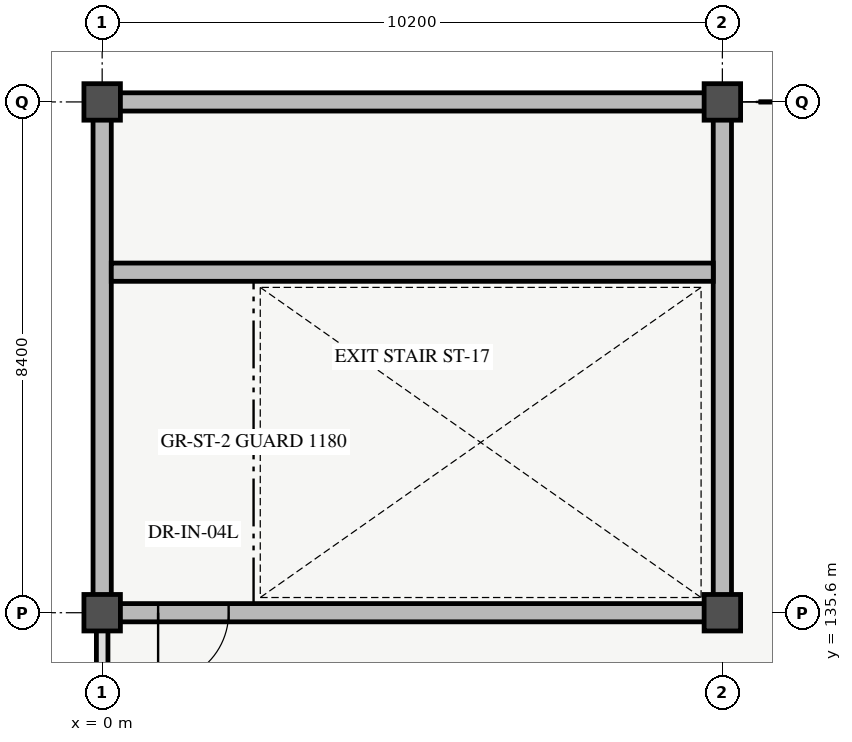
"""IFC4 building model, lengths in metres.
Left out: names, types, materials, properties, quantities, classifications, styles, units other than length and angle.
Written with IfcOpenShell. Run it as: python <this file> out.ifc"""

import sys

from ifc_helpers import new_model, si_unit, direction, frame, frame_2d, origin, origin_2d, place, context, subcontext, project, spatial, rectangle, extrude, element, fill, save


model = new_model("IFC4")
c1 = context("Model", 3, precision=1e-05, world=origin(), true_north=direction((0.0, 1.0)))
c2 = subcontext(c1, "Body", "Model", "MODEL_VIEW")
j1 = project(units=[si_unit("LENGTHUNIT", "METRE"), si_unit("PLANEANGLEUNIT", "RADIAN")], contexts=[c1])
p1 = place(None, origin())
s1 = spatial("IfcSite", under=j1, at=p1, CompositionType="ELEMENT")
p2 = place(p1, origin())
s2 = spatial("IfcBuilding", under=s1, at=p2, CompositionType="ELEMENT")
p3 = place(p2, frame((0.0, 0.0, 23.4)))
s3 = spatial("IfcBuildingStorey", under=s2, at=p3, CompositionType="ELEMENT", Elevation=23.4)
for number, where, z_axis, x_axis in (
    (1, (0.0, 135.6, 0.0), (0.0, 0.0, 1.0), (1.0, 0.0, 0.0)),
    (2, (0.0, 144.0, 0.0), (0.0, 0.0, 1.0), (1.0, 0.0, 0.0)),
    (3, (10.2, 135.6, 0.0), (0.0, 0.0, 1.0), (1.0, 0.0, 0.0)),
    (4, (10.2, 144.0, 0.0), (0.0, 0.0, 1.0), (1.0, 0.0, 0.0)),
):
    element("IfcColumn", number, at=place(p3, frame(where, z_axis=z_axis, x_axis=x_axis)), inside=s3, PredefinedType="COLUMN", context=c2, shape_type="SweptSolid", body=[
        extrude(rectangle(XDim=0.6, YDim=0.6, at=origin_2d()), origin(), (0.0, 0.0, 1.0), 4.2),
    ])
p4 = place(p3, frame((0.0, 127.44, 0.0), z_axis=(0.0, 0.0, 1.0), x_axis=(0.0, 1.0, 0.0)))
e5 = element("IfcWall", 5, at=p4, inside=s3, PredefinedType="STANDARD", context=c2, shape_type="SweptSolid", body=[
    extrude(rectangle(XDim=7.92, YDim=0.19, at=frame_2d((3.96, 0.0))), origin(), (0.0, 0.0, 1.0), 3.06),
])
p5 = place(p4, frame((2.61, 0.0, 0.9)))
e6 = element("IfcOpeningElement", 6, at=p5, cuts=e5, PredefinedType="OPENING", context=c2, shape_type="SweptSolid", body=[
    extrude(rectangle(XDim=2.7, YDim=1.85, at=frame_2d((1.35, 0.925))), frame((0.0, 0.105, 0.0), z_axis=(0.0, -1.0, 0.0), x_axis=(1.0, 0.0, 0.0)), (0.0, 0.0, 1.0), 0.21),
])
p6 = place(p3, frame((0.0, 135.6, 0.0), z_axis=(0.0, 0.0, 1.0), x_axis=(1.0, 0.0, 0.0)))
e7 = element("IfcWall", 7, at=p6, inside=s3, PredefinedType="SHEAR", context=c2, shape_type="SweptSolid", body=[
    extrude(rectangle(XDim=10.2, YDim=0.3, at=frame_2d((5.1, 0.0))), origin(), (0.0, 0.0, 1.0), 4.2),
])
p7 = place(p6, frame((0.92, 0.0, 0.0)))
e8 = element("IfcOpeningElement", 8, at=p7, cuts=e7, PredefinedType="OPENING", context=c2, shape_type="SweptSolid", body=[
    extrude(rectangle(XDim=1.16, YDim=2.2, at=frame_2d((0.58, 1.1))), frame((0.0, 0.16, 0.0), z_axis=(0.0, -1.0, 0.0), x_axis=(1.0, 0.0, 0.0)), (0.0, 0.0, 1.0), 0.32),
])
p8 = place(p3, frame((0.0, 144.0, 0.0), z_axis=(0.0, 0.0, 1.0), x_axis=(1.0, 0.0, 0.0)))
e9 = element("IfcWall", 9, at=p8, inside=s3, PredefinedType="SHEAR", context=c2, shape_type="SweptSolid", body=[
    extrude(rectangle(XDim=10.2, YDim=0.3, at=frame_2d((5.1, 0.0))), origin(), (0.0, 0.0, 1.0), 4.2),
])
for number, where, z_axis, x_axis in (
    (10, (0.0, 135.6, 0.0), (0.0, 0.0, 1.0), (0.0, 1.0, 0.0)),
    (11, (10.2, 135.6, 0.0), (0.0, 0.0, 1.0), (0.0, 1.0, 0.0)),
):
    element("IfcWall", number, at=place(p3, frame(where, z_axis=z_axis, x_axis=x_axis)), inside=s3, PredefinedType="SHEAR", context=c2, shape_type="SweptSolid", body=[
        extrude(rectangle(XDim=8.4, YDim=0.3, at=frame_2d((4.2, 0.0))), origin(), (0.0, 0.0, 1.0), 4.2),
    ])
p9 = place(p3, frame((0.15, 141.2, 0.0), z_axis=(0.0, 0.0, 1.0), x_axis=(1.0, 0.0, 0.0)))
e12 = element("IfcWall", 12, at=p9, inside=s3, PredefinedType="SHEAR", context=c2, shape_type="SweptSolid", body=[
    extrude(rectangle(XDim=9.9, YDim=0.3, at=frame_2d((4.95, 0.0))), origin(), (0.0, 0.0, 1.0), 4.2),
])
p10 = place(p7, origin())
e13 = element("IfcDoor", 13, at=p10, inside=s3, OperationType="SINGLE_SWING_LEFT", PredefinedType="DOOR", context=c2, shape_type="SweptSolid", body=[
    extrude(rectangle(XDim=1.16, YDim=2.2, at=frame_2d((0.58, 1.1))), frame((0.0, 0.025, 0.0), z_axis=(0.0, -1.0, 0.0), x_axis=(1.0, 0.0, 0.0)), (0.0, 0.0, 1.0), 0.05),
])
fill(e8, e13)
save(model, sys.argv[1])
